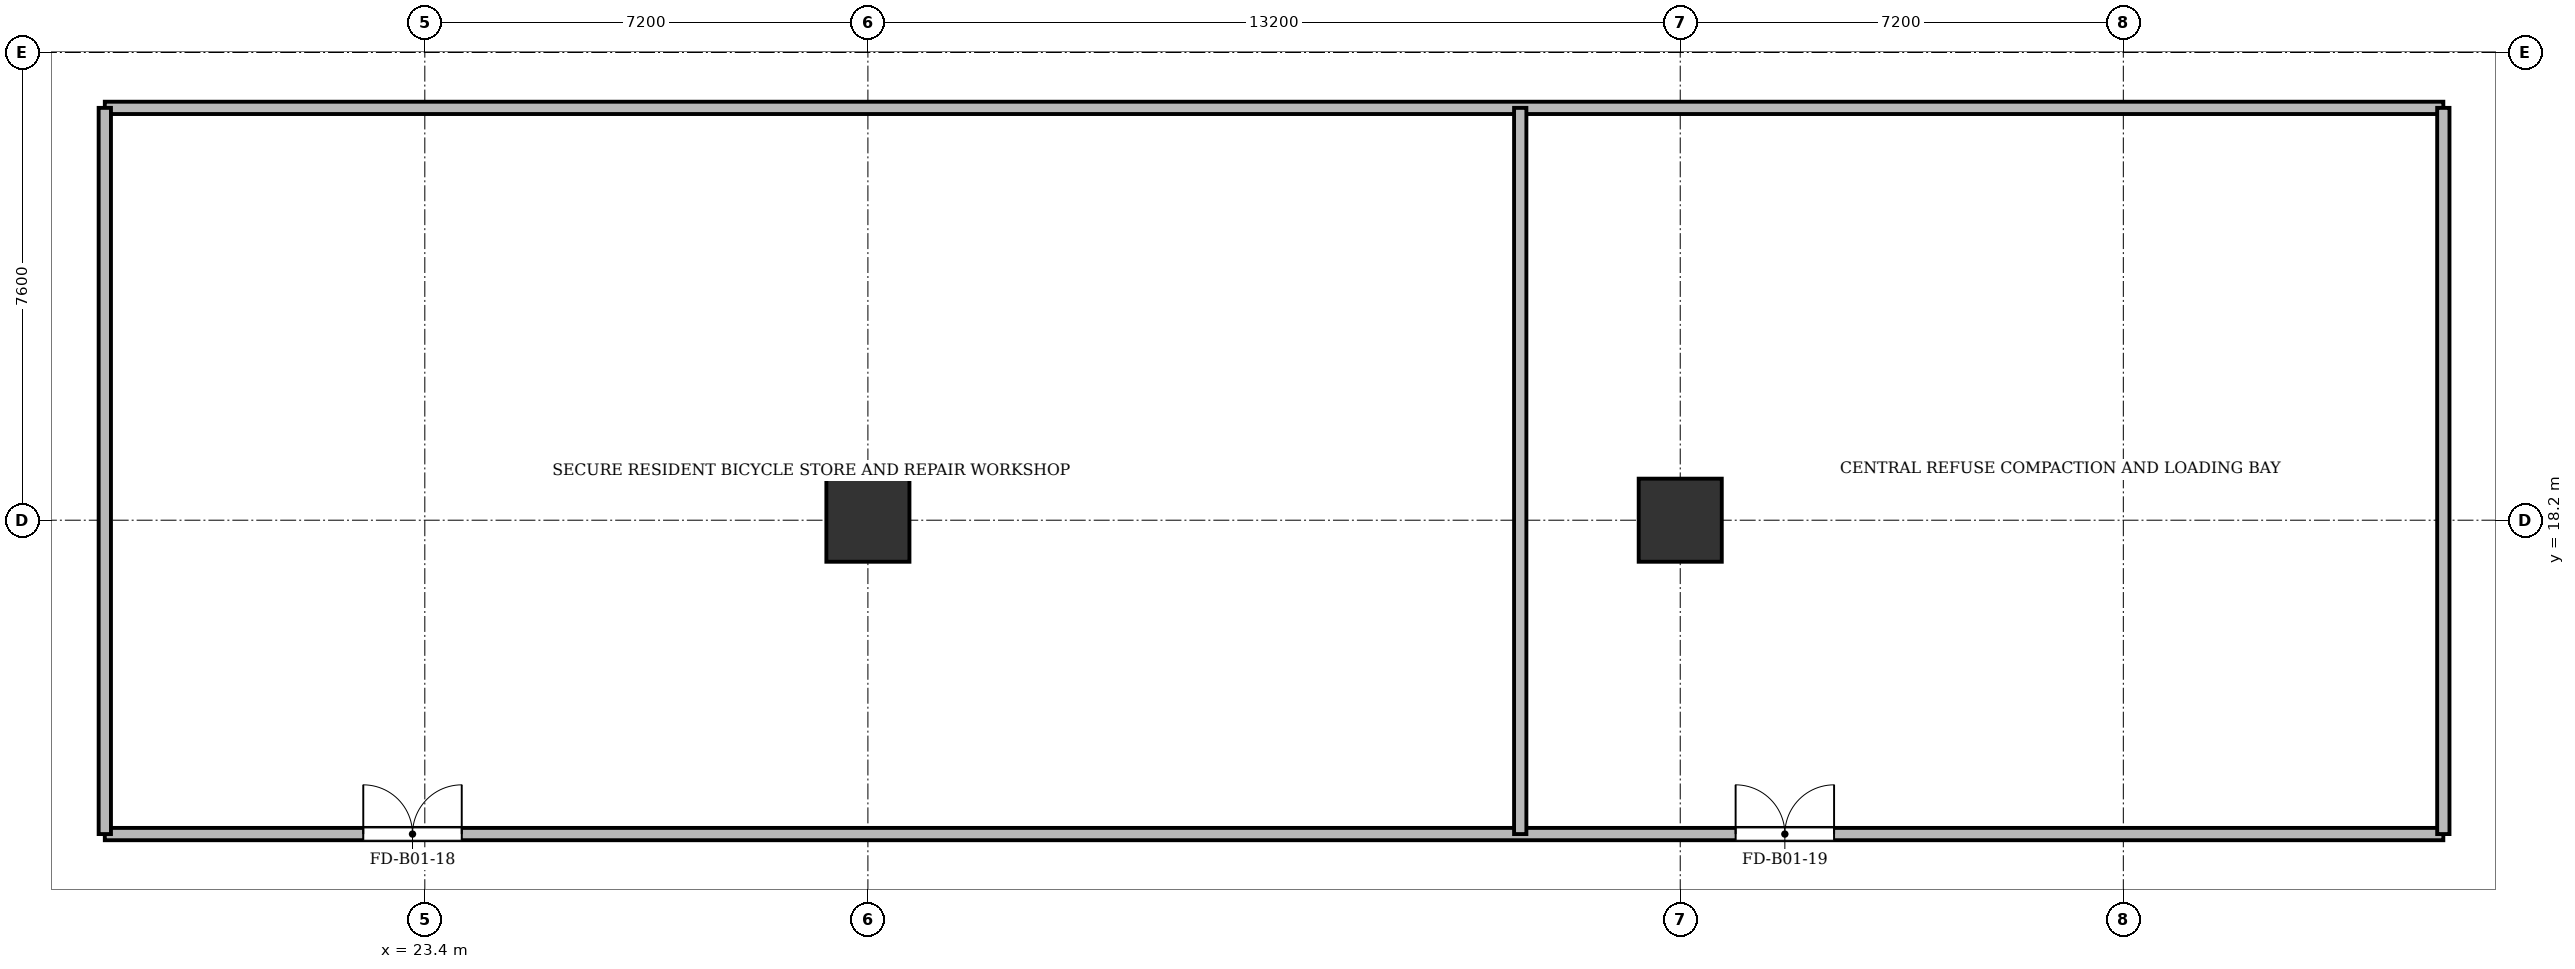
"""IFC4 building model, lengths in metres.
Left out: names, types, materials, properties, quantities, classifications, styles, units other than length and angle.
Written with IfcOpenShell. Run it as: python <this file> out.ifc"""

import sys

from ifc_helpers import new_model, si_unit, direction, frame, frame_2d, origin, origin_2d, place, context, subcontext, project, spatial, rectangle, extrude, source, transform, mapped, element, fill, save


model = new_model("IFC4")
c1 = context("Model", 3, precision=1e-05, world=origin(), true_north=direction((0.0, 1.0)))
c2 = subcontext(c1, "Body", "Model", "MODEL_VIEW")
j1 = project(units=[si_unit("LENGTHUNIT", "METRE"), si_unit("PLANEANGLEUNIT", "RADIAN")], contexts=[c1])
p1 = place(None, origin())
s1 = spatial("IfcSite", under=j1, at=p1, CompositionType="ELEMENT")
p2 = place(p1, origin())
s2 = spatial("IfcBuilding", under=s1, at=p2, CompositionType="ELEMENT")
p3 = place(p2, frame((0.0, 0.0, -4.3)))
s3 = spatial("IfcBuildingStorey", under=s2, at=p3, CompositionType="ELEMENT", Elevation=-4.3)
m1 = source(origin(), c2, "Body", "SweptSolid", [
    extrude(rectangle(XDim=1.35, YDim=1.35, at=origin_2d()), origin(), (0.0, 0.0, 1.0), 4.3),
])
for number, where, z_axis, x_axis in (
    (1, (30.6, 18.2, 0.0), (0.0, 0.0, 1.0), (1.0, 0.0, 0.0)),
    (2, (43.8, 18.2, 0.0), (0.0, 0.0, 1.0), (1.0, 0.0, 0.0)),
):
    element("IfcColumn", number, at=place(p3, frame(where, z_axis=z_axis, x_axis=x_axis)), inside=s3, PredefinedType="COLUMN", context=c2, shape_type="MappedRepresentation", body=[
        mapped(m1, transform((0.0, 0.0, 0.0), x_axis=(1.0, 0.0, 0.0), y_axis=(0.0, 1.0, 0.0), z_axis=(0.0, 0.0, 1.0), scale=1.0)),
    ])
p4 = place(p3, frame((18.2, 13.1, 0.0), z_axis=(0.0, 0.0, 1.0), x_axis=(1.0, 0.0, 0.0)))
e3 = element("IfcWall", 3, at=p4, inside=s3, PredefinedType="PARTITIONING", context=c2, shape_type="SweptSolid", body=[
    extrude(rectangle(XDim=38.0, YDim=0.2, at=frame_2d((19.0, 0.0))), origin(), (0.0, 0.0, 1.0), 3.29),
])
p5 = place(p4, frame((4.2, 0.0, 0.0)))
e4 = element("IfcOpeningElement", 4, at=p5, cuts=e3, PredefinedType="OPENING", context=c2, shape_type="SweptSolid", body=[
    extrude(rectangle(XDim=1.6, YDim=2.2, at=frame_2d((0.8, 1.1))), frame((0.0, 0.11, 0.0), z_axis=(0.0, -1.0, 0.0), x_axis=(1.0, 0.0, 0.0)), (0.0, 0.0, 1.0), 0.22),
])
p6 = place(p4, frame((26.5, 0.0, 0.0)))
e5 = element("IfcOpeningElement", 5, at=p6, cuts=e3, PredefinedType="OPENING", context=c2, shape_type="SweptSolid", body=[
    extrude(rectangle(XDim=1.6, YDim=2.2, at=frame_2d((0.8, 1.1))), frame((0.0, 0.11, 0.0), z_axis=(0.0, -1.0, 0.0), x_axis=(1.0, 0.0, 0.0)), (0.0, 0.0, 1.0), 0.22),
])
p7 = place(p3, frame((18.2, 24.9, 0.0), z_axis=(0.0, 0.0, 1.0), x_axis=(1.0, 0.0, 0.0)))
e6 = element("IfcWall", 6, at=p7, inside=s3, PredefinedType="PARTITIONING", context=c2, shape_type="SweptSolid", body=[
    extrude(rectangle(XDim=38.0, YDim=0.2, at=frame_2d((19.0, 0.0))), origin(), (0.0, 0.0, 1.0), 3.29),
])
for number, where, z_axis, x_axis in (
    (7, (18.2, 13.1, 0.0), (0.0, 0.0, 1.0), (0.0, 1.0, 0.0)),
    (8, (56.2, 13.1, 0.0), (0.0, 0.0, 1.0), (0.0, 1.0, 0.0)),
    (9, (41.2, 13.1, 0.0), (0.0, 0.0, 1.0), (0.0, 1.0, 0.0)),
):
    element("IfcWall", number, at=place(p3, frame(where, z_axis=z_axis, x_axis=x_axis)), inside=s3, PredefinedType="PARTITIONING", context=c2, shape_type="SweptSolid", body=[
        extrude(rectangle(XDim=11.8, YDim=0.2, at=frame_2d((5.9, 0.0))), origin(), (0.0, 0.0, 1.0), 3.24),
    ])
m2 = source(origin(), c2, "Body", "SweptSolid", [
    extrude(rectangle(XDim=1.6, YDim=2.2, at=frame_2d((0.8, 1.1))), frame((0.0, 0.025, 0.0), z_axis=(0.0, -1.0, 0.0), x_axis=(1.0, 0.0, 0.0)), (0.0, 0.0, 1.0), 0.05),
])
p8 = place(p5, origin())
e10 = element("IfcDoor", 10, at=p8, inside=s3, OperationType="DOUBLE_DOOR_SINGLE_SWING", PredefinedType="DOOR", context=c2, shape_type="MappedRepresentation", body=[
    mapped(m2, transform((0.0, 0.0, 0.0), x_axis=(1.0, 0.0, 0.0), y_axis=(0.0, 1.0, 0.0), z_axis=(0.0, 0.0, 1.0), scale=1.0)),
])
fill(e4, e10)
p9 = place(p6, origin())
e11 = element("IfcDoor", 11, at=p9, inside=s3, OperationType="DOUBLE_DOOR_SINGLE_SWING", PredefinedType="DOOR", context=c2, shape_type="MappedRepresentation", body=[
    mapped(m2, transform((0.0, 0.0, 0.0), x_axis=(1.0, 0.0, 0.0), y_axis=(0.0, 1.0, 0.0), z_axis=(0.0, 0.0, 1.0), scale=1.0)),
])
fill(e5, e11)
save(model, sys.argv[1])
